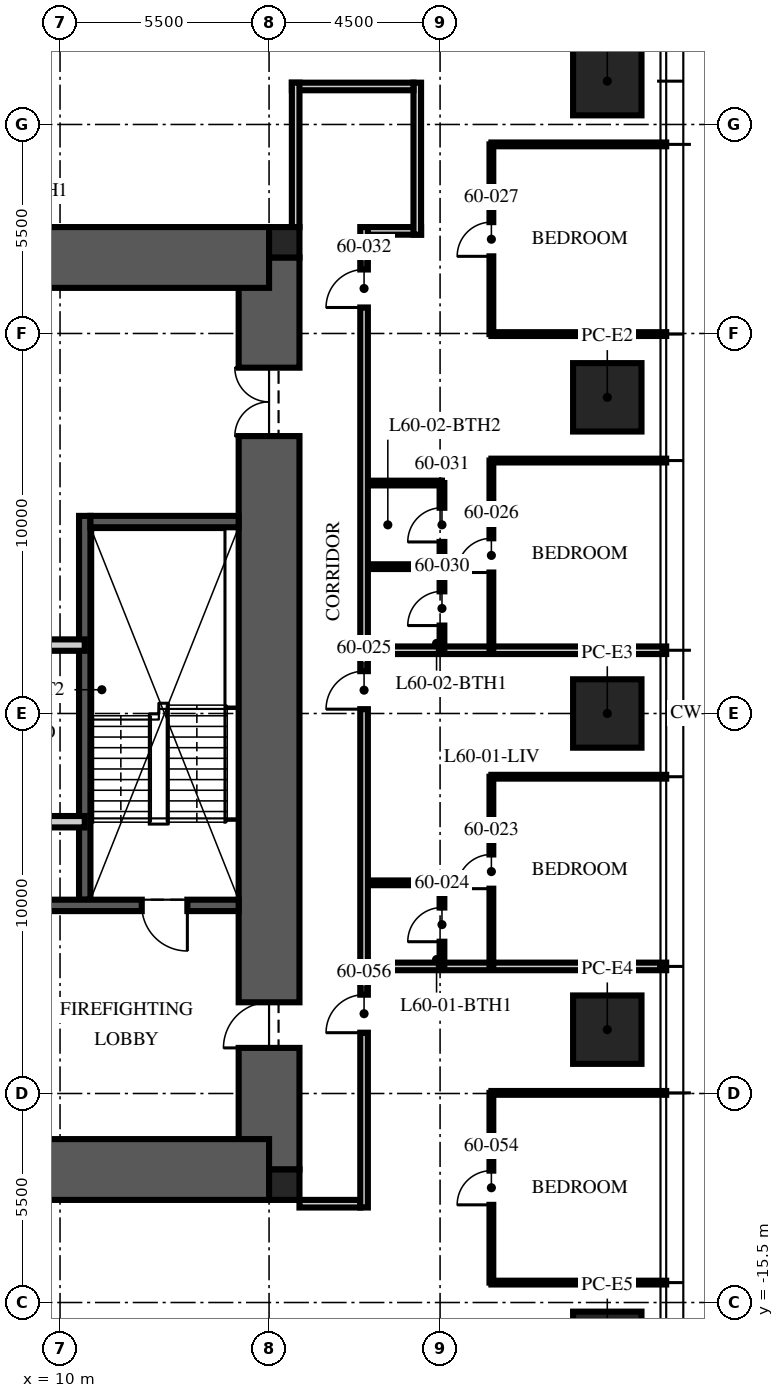
"""IFC4 building model, lengths in metres.
Left out: names, types, materials, properties, quantities, classifications, styles, units other than length and angle.
Written with IfcOpenShell. Run it as: python <this file> out.ifc"""

import sys

from ifc_helpers import new_model, si_unit, direction, frame, frame_2d, origin, origin_2d, place, context, subcontext, project, spatial, rectangle, extrude, element, fill, save


model = new_model("IFC4")
c1 = context("Model", 3, precision=1e-05, world=origin(), true_north=direction((0.0, 1.0)))
c2 = subcontext(c1, "Body", "Model", "MODEL_VIEW")
j1 = project(units=[si_unit("LENGTHUNIT", "METRE"), si_unit("PLANEANGLEUNIT", "RADIAN")], contexts=[c1])
p1 = place(None, origin())
s1 = spatial("IfcSite", under=j1, at=p1, CompositionType="ELEMENT")
p2 = place(p1, origin())
s2 = spatial("IfcBuilding", under=s1, at=p2, CompositionType="ELEMENT")
p3 = place(p2, frame((0.0, 0.0, 240.75)))
s3 = spatial("IfcBuildingStorey", under=s2, at=p3, CompositionType="ELEMENT", Elevation=240.75)
p4 = place(p3, frame((15.5, -12.0, -0.25), z_axis=(0.0, 0.0, 1.0), x_axis=(0.0, 1.0, 0.0)))
e1 = element("IfcWall", 1, at=p4, inside=s3, PredefinedType="SHEAR", context=c2, shape_type="SweptSolid", body=[
    extrude(rectangle(XDim=24.0, YDim=1.6, at=frame_2d((12.0, 0.0))), origin(), (0.0, 0.0, 1.0), 3.75),
])
p5 = place(p4, frame((3.2, 0.0, 0.25)))
e2 = element("IfcOpeningElement", 2, at=p5, cuts=e1, PredefinedType="OPENING", context=c2, shape_type="SweptSolid", body=[
    extrude(rectangle(XDim=1.2, YDim=2.1, at=frame_2d((0.6, 1.05))), frame((0.0, 0.81, 0.0), z_axis=(0.0, -1.0, 0.0), x_axis=(1.0, 0.0, 0.0)), (0.0, 0.0, 1.0), 1.62),
])
p6 = place(p4, frame((19.3, 0.0, 0.25)))
e3 = element("IfcOpeningElement", 3, at=p6, cuts=e1, PredefinedType="OPENING", context=c2, shape_type="SweptSolid", body=[
    extrude(rectangle(XDim=1.8, YDim=2.1, at=frame_2d((0.9, 1.05))), frame((0.0, 0.81, 0.0), z_axis=(0.0, -1.0, 0.0), x_axis=(1.0, 0.0, 0.0)), (0.0, 0.0, 1.0), 1.62),
])
for number, where, z_axis, x_axis in (
    (4, (-15.5, 12.0, -0.25), (0.0, 0.0, 1.0), (1.0, 0.0, 0.0)),
    (5, (-15.5, -12.0, -0.25), (0.0, 0.0, 1.0), (1.0, 0.0, 0.0)),
):
    element("IfcWall", number, at=place(p3, frame(where, z_axis=z_axis, x_axis=x_axis)), inside=s3, PredefinedType="SHEAR", context=c2, shape_type="SweptSolid", body=[
        extrude(rectangle(XDim=31.0, YDim=1.6, at=frame_2d((15.5, 0.0))), origin(), (0.0, 0.0, 1.0), 3.75),
    ])
for number, where, z_axis, x_axis in (
    (6, (15.9, 12.4, -0.25), (0.0, 0.0, 1.0), (1.0, 0.0, 0.0)),
    (7, (15.9, -12.4, -0.25), (0.0, 0.0, 1.0), (1.0, 0.0, 0.0)),
):
    element("IfcColumn", number, at=place(p3, frame(where, z_axis=z_axis, x_axis=x_axis)), inside=s3, PredefinedType="COLUMN", context=c2, shape_type="SweptSolid", body=[
        extrude(rectangle(XDim=0.8, YDim=0.8, at=origin_2d()), origin(), (0.0, 0.0, 1.0), 3.75),
    ])
for number, where, z_axis, x_axis in (
    (8, (24.4, 16.64, 0.0), (0.0, 0.0, 1.0), (0.0, 1.0, 0.0)),
    (9, (24.4, 8.32, 0.0), (0.0, 0.0, 1.0), (0.0, 1.0, 0.0)),
    (10, (24.4, 0.0, 0.0), (0.0, 0.0, 1.0), (0.0, 1.0, 0.0)),
    (11, (24.4, -8.32, 0.0), (0.0, 0.0, 1.0), (0.0, 1.0, 0.0)),
    (12, (24.4, -16.64, 0.0), (0.0, 0.0, 1.0), (0.0, 1.0, 0.0)),
):
    element("IfcColumn", number, at=place(p3, frame(where, z_axis=z_axis, x_axis=x_axis)), inside=s3, PredefinedType="COLUMN", context=c2, shape_type="SweptSolid", body=[
        extrude(rectangle(XDim=1.8, YDim=1.8, at=origin_2d()), origin(), (0.0, 0.0, 1.0), 3.75),
    ])
p7 = place(p3, frame((10.65, -4.9, 0.0), z_axis=(0.0, 0.0, 1.0), x_axis=(0.0, 1.0, 0.0)))
e13 = element("IfcWall", 13, at=p7, inside=s3, PredefinedType="SOLIDWALL", context=c2, shape_type="SweptSolid", body=[
    extrude(rectangle(XDim=10.1, YDim=0.3, at=frame_2d((5.05, 0.0))), origin(), (0.0, 0.0, 1.0), 3.5),
])
p8 = place(p3, frame((14.7, -5.05, 0.0), z_axis=(0.0, 0.0, 1.0), x_axis=(-1.0, 0.0, 0.0)))
e14 = element("IfcWall", 14, at=p8, inside=s3, PredefinedType="SOLIDWALL", context=c2, shape_type="SweptSolid", body=[
    extrude(rectangle(XDim=5.9, YDim=0.3, at=frame_2d((2.95, 0.0))), origin(), (0.0, 0.0, 1.0), 3.5),
])
p9 = place(p8, frame((1.35, 0.0, 0.0)))
e15 = element("IfcOpeningElement", 15, at=p9, cuts=e14, PredefinedType="OPENING", context=c2, shape_type="SweptSolid", body=[
    extrude(rectangle(XDim=1.2, YDim=2.1, at=frame_2d((0.6, 1.05))), frame((0.0, 0.16, 0.0), z_axis=(0.0, -1.0, 0.0), x_axis=(1.0, 0.0, 0.0)), (0.0, 0.0, 1.0), 0.32),
])
p10 = place(p3, frame((14.7, 5.05, 0.0), z_axis=(0.0, 0.0, 1.0), x_axis=(-1.0, 0.0, 0.0)))
e16 = element("IfcWall", 16, at=p10, inside=s3, PredefinedType="SOLIDWALL", context=c2, shape_type="SweptSolid", body=[
    extrude(rectangle(XDim=3.9, YDim=0.3, at=frame_2d((1.95, 0.0))), origin(), (0.0, 0.0, 1.0), 3.5),
])
p11 = place(p3, frame((-10.65, 1.8, 0.0), z_axis=(0.0, 0.0, 1.0), x_axis=(1.0, 0.0, 0.0)))
e17 = element("IfcWall", 17, at=p11, inside=s3, PredefinedType="PARTITIONING", context=c2, shape_type="SweptSolid", body=[
    extrude(rectangle(XDim=21.3, YDim=0.3, at=frame_2d((10.65, 0.0))), origin(), (0.0, 0.0, 1.0), 3.5),
])
p12 = place(p11, frame((10.05, 0.0, 0.0)))
e18 = element("IfcOpeningElement", 18, at=p12, cuts=e17, PredefinedType="OPENING", context=c2, shape_type="SweptSolid", body=[
    extrude(rectangle(XDim=1.2, YDim=2.1, at=frame_2d((0.6, 1.05))), frame((0.0, 0.16, 0.0), z_axis=(0.0, -1.0, 0.0), x_axis=(1.0, 0.0, 0.0)), (0.0, 0.0, 1.0), 0.32),
])
p13 = place(p11, frame((19.238, 0.0, 0.0)))
e19 = element("IfcOpeningElement", 19, at=p13, cuts=e17, PredefinedType="OPENING", context=c2, shape_type="SweptSolid", body=[
    extrude(rectangle(XDim=0.9, YDim=2.1, at=frame_2d((0.45, 1.05))), frame((0.0, 0.16, 0.0), z_axis=(0.0, -1.0, 0.0), x_axis=(1.0, 0.0, 0.0)), (0.0, 0.0, 1.0), 0.32),
])
p14 = place(p3, frame((10.65, -2.848, 0.0), z_axis=(0.0, 0.0, 1.0), x_axis=(-1.0, 0.0, 0.0)))
e20 = element("IfcWall", 20, at=p14, inside=s3, PredefinedType="PARTITIONING", context=c2, shape_type="SweptSolid", body=[
    extrude(rectangle(XDim=6.45, YDim=0.3, at=frame_2d((3.225, 0.0))), origin(), (0.0, 0.0, 1.0), 3.5),
])
p15 = place(p3, frame((18.1, 12.7, 0.0), z_axis=(0.0, 0.0, 1.0), x_axis=(1.0, 0.0, 0.0)))
e21 = element("IfcWall", 21, at=p15, inside=s3, PredefinedType="PARTITIONING", context=c2, shape_type="SweptSolid", body=[
    extrude(rectangle(XDim=1.4, YDim=0.2, at=frame_2d((0.7, 0.0))), origin(), (0.0, 0.0, 1.0), 2.81),
])
p16 = place(p3, frame((19.4, 12.6, 0.0), z_axis=(0.0, 0.0, 1.0), x_axis=(0.0, 1.0, 0.0)))
e22 = element("IfcWall", 22, at=p16, inside=s3, PredefinedType="PARTITIONING", context=c2, shape_type="SweptSolid", body=[
    extrude(rectangle(XDim=4.0, YDim=0.2, at=frame_2d((2.0, 0.0))), origin(), (0.0, 0.0, 1.0), 2.6),
])
p17 = place(p3, frame((19.3, 16.5, 0.0), z_axis=(0.0, 0.0, 1.0), x_axis=(-1.0, 0.0, 0.0)))
e23 = element("IfcWall", 23, at=p17, inside=s3, PredefinedType="PARTITIONING", context=c2, shape_type="SweptSolid", body=[
    extrude(rectangle(XDim=3.2, YDim=0.2, at=frame_2d((1.6, 0.0))), origin(), (0.0, 0.0, 1.0), 2.3),
])
p18 = place(p3, frame((16.2, 16.6, 0.0), z_axis=(0.0, 0.0, 1.0), x_axis=(0.0, -1.0, 0.0)))
e24 = element("IfcWall", 24, at=p18, inside=s3, PredefinedType="PARTITIONING", context=c2, shape_type="SweptSolid", body=[
    extrude(rectangle(XDim=3.8, YDim=0.2, at=frame_2d((1.9, 0.0))), origin(), (0.0, 0.0, 1.0), 2.3),
])
p19 = place(p3, frame((16.3, -12.9, 0.0), z_axis=(0.0, 0.0, 1.0), x_axis=(1.0, 0.0, 0.0)))
e25 = element("IfcWall", 25, at=p19, inside=s3, PredefinedType="PARTITIONING", context=c2, shape_type="SweptSolid", body=[
    extrude(rectangle(XDim=1.6, YDim=0.2, at=frame_2d((0.8, 0.0))), origin(), (0.0, 0.0, 1.0), 2.3),
])
p20 = place(p3, frame((18.1, -6.656, 0.0), z_axis=(0.0, 0.0, 1.0), x_axis=(1.0, 0.0, 0.0)))
e26 = element("IfcWall", 26, at=p20, inside=s3, PredefinedType="PARTITIONING", context=c2, shape_type="SweptSolid", body=[
    extrude(rectangle(XDim=7.85, YDim=0.2, at=frame_2d((3.925, 0.0))), origin(), (0.0, 0.0, 1.0), 2.91),
])
p21 = place(p3, frame((21.35, -1.664, 0.0), z_axis=(0.0, 0.0, 1.0), x_axis=(1.0, 0.0, 0.0)))
e27 = element("IfcWall", 27, at=p21, inside=s3, PredefinedType="PARTITIONING", context=c2, shape_type="SweptSolid", body=[
    extrude(rectangle(XDim=4.6, YDim=0.1, at=frame_2d((2.3, 0.0))), origin(), (0.0, 0.0, 1.0), 2.91),
])
p22 = place(p3, frame((18.1, 1.664, 0.0), z_axis=(0.0, 0.0, 1.0), x_axis=(1.0, 0.0, 0.0)))
e28 = element("IfcWall", 28, at=p22, inside=s3, PredefinedType="PARTITIONING", context=c2, shape_type="SweptSolid", body=[
    extrude(rectangle(XDim=7.85, YDim=0.2, at=frame_2d((3.925, 0.0))), origin(), (0.0, 0.0, 1.0), 2.91),
])
for number, where, z_axis, x_axis in (
    (29, (21.35, 6.656, 0.0), (0.0, 0.0, 1.0), (1.0, 0.0, 0.0)),
    (30, (21.35, 9.984, 0.0), (0.0, 0.0, 1.0), (1.0, 0.0, 0.0)),
    (31, (21.35, 14.976, 0.0), (0.0, 0.0, 1.0), (1.0, 0.0, 0.0)),
    (32, (21.35, -14.976, 0.0), (0.0, 0.0, 1.0), (1.0, 0.0, 0.0)),
    (33, (21.35, -9.984, 0.0), (0.0, 0.0, 1.0), (1.0, 0.0, 0.0)),
):
    element("IfcWall", number, at=place(p3, frame(where, z_axis=z_axis, x_axis=x_axis)), inside=s3, PredefinedType="PARTITIONING", context=c2, shape_type="SweptSolid", body=[
        extrude(rectangle(XDim=4.6, YDim=0.1, at=frame_2d((2.3, 0.0))), origin(), (0.0, 0.0, 1.0), 2.91),
    ])
p23 = place(p3, frame((21.35, -6.656, 0.0), z_axis=(0.0, 0.0, 1.0), x_axis=(0.0, 1.0, 0.0)))
e34 = element("IfcWall", 34, at=p23, inside=s3, PredefinedType="PARTITIONING", context=c2, shape_type="SweptSolid", body=[
    extrude(rectangle(XDim=4.992, YDim=0.1, at=frame_2d((2.496, 0.0))), origin(), (0.0, 0.0, 1.0), 2.81),
])
p24 = place(p23, frame((2.046, 0.0, 0.0)))
e35 = element("IfcOpeningElement", 35, at=p24, cuts=e34, PredefinedType="OPENING", context=c2, shape_type="SweptSolid", body=[
    extrude(rectangle(XDim=0.9, YDim=2.1, at=frame_2d((0.45, 1.05))), frame((0.0, 0.06, 0.0), z_axis=(0.0, -1.0, 0.0), x_axis=(1.0, 0.0, 0.0)), (0.0, 0.0, 1.0), 0.12),
])
p25 = place(p3, frame((20.05, -6.656, 0.0), z_axis=(0.0, 0.0, 1.0), x_axis=(0.0, 1.0, 0.0)))
e36 = element("IfcWall", 36, at=p25, inside=s3, PredefinedType="PARTITIONING", context=c2, shape_type="SweptSolid", body=[
    extrude(rectangle(XDim=2.2, YDim=0.125, at=frame_2d((1.1, 0.0))), origin(), (0.0, 0.0, 1.0), 3.5),
])
p26 = place(p25, frame((0.65, 0.0, 0.0)))
e37 = element("IfcOpeningElement", 37, at=p26, cuts=e36, PredefinedType="OPENING", context=c2, shape_type="SweptSolid", body=[
    extrude(rectangle(XDim=0.9, YDim=2.1, at=frame_2d((0.45, 1.05))), frame((0.0, 0.073, 0.0), z_axis=(0.0, -1.0, 0.0), x_axis=(1.0, 0.0, 0.0)), (0.0, 0.0, 1.0), 0.145),
])
p27 = place(p3, frame((18.1, -4.456, 0.0), z_axis=(0.0, 0.0, 1.0), x_axis=(1.0, 0.0, 0.0)))
e38 = element("IfcWall", 38, at=p27, inside=s3, PredefinedType="PARTITIONING", context=c2, shape_type="SweptSolid", body=[
    extrude(rectangle(XDim=1.95, YDim=0.125, at=frame_2d((0.975, 0.0))), origin(), (0.0, 0.0, 1.0), 3.5),
])
p28 = place(p3, frame((21.35, 1.664, 0.0), z_axis=(0.0, 0.0, 1.0), x_axis=(0.0, 1.0, 0.0)))
e39 = element("IfcWall", 39, at=p28, inside=s3, PredefinedType="PARTITIONING", context=c2, shape_type="SweptSolid", body=[
    extrude(rectangle(XDim=4.992, YDim=0.1, at=frame_2d((2.496, 0.0))), origin(), (0.0, 0.0, 1.0), 2.81),
])
p29 = place(p28, frame((2.046, 0.0, 0.0)))
e40 = element("IfcOpeningElement", 40, at=p29, cuts=e39, PredefinedType="OPENING", context=c2, shape_type="SweptSolid", body=[
    extrude(rectangle(XDim=0.9, YDim=2.1, at=frame_2d((0.45, 1.05))), frame((0.0, 0.06, 0.0), z_axis=(0.0, -1.0, 0.0), x_axis=(1.0, 0.0, 0.0)), (0.0, 0.0, 1.0), 0.12),
])
p30 = place(p3, frame((21.35, 9.984, 0.0), z_axis=(0.0, 0.0, 1.0), x_axis=(0.0, 1.0, 0.0)))
e41 = element("IfcWall", 41, at=p30, inside=s3, PredefinedType="PARTITIONING", context=c2, shape_type="SweptSolid", body=[
    extrude(rectangle(XDim=4.992, YDim=0.1, at=frame_2d((2.496, 0.0))), origin(), (0.0, 0.0, 1.0), 2.81),
])
p31 = place(p30, frame((2.046, 0.0, 0.0)))
e42 = element("IfcOpeningElement", 42, at=p31, cuts=e41, PredefinedType="OPENING", context=c2, shape_type="SweptSolid", body=[
    extrude(rectangle(XDim=0.9, YDim=2.1, at=frame_2d((0.45, 1.05))), frame((0.0, 0.06, 0.0), z_axis=(0.0, -1.0, 0.0), x_axis=(1.0, 0.0, 0.0)), (0.0, 0.0, 1.0), 0.12),
])
p32 = place(p3, frame((20.05, 1.664, 0.0), z_axis=(0.0, 0.0, 1.0), x_axis=(0.0, 1.0, 0.0)))
e43 = element("IfcWall", 43, at=p32, inside=s3, PredefinedType="PARTITIONING", context=c2, shape_type="SweptSolid", body=[
    extrude(rectangle(XDim=4.4, YDim=0.125, at=frame_2d((2.2, 0.0))), origin(), (0.0, 0.0, 1.0), 2.81),
])
p33 = place(p32, frame((0.65, 0.0, 0.0)))
e44 = element("IfcOpeningElement", 44, at=p33, cuts=e43, PredefinedType="OPENING", context=c2, shape_type="SweptSolid", body=[
    extrude(rectangle(XDim=0.9, YDim=2.1, at=frame_2d((0.45, 1.05))), frame((0.0, 0.073, 0.0), z_axis=(0.0, -1.0, 0.0), x_axis=(1.0, 0.0, 0.0)), (0.0, 0.0, 1.0), 0.145),
])
p34 = place(p32, frame((2.85, 0.0, 0.0)))
e45 = element("IfcOpeningElement", 45, at=p34, cuts=e43, PredefinedType="OPENING", context=c2, shape_type="SweptSolid", body=[
    extrude(rectangle(XDim=0.9, YDim=2.1, at=frame_2d((0.45, 1.05))), frame((0.0, 0.073, 0.0), z_axis=(0.0, -1.0, 0.0), x_axis=(1.0, 0.0, 0.0)), (0.0, 0.0, 1.0), 0.145),
])
for number, where, z_axis, x_axis in (
    (46, (18.1, 3.864, 0.0), (0.0, 0.0, 1.0), (1.0, 0.0, 0.0)),
    (47, (18.1, 6.064, 0.0), (0.0, 0.0, 1.0), (1.0, 0.0, 0.0)),
):
    element("IfcWall", number, at=place(p3, frame(where, z_axis=z_axis, x_axis=x_axis)), inside=s3, PredefinedType="PARTITIONING", context=c2, shape_type="SweptSolid", body=[
        extrude(rectangle(XDim=1.95, YDim=0.125, at=frame_2d((0.975, 0.0))), origin(), (0.0, 0.0, 1.0), 3.5),
    ])
p35 = place(p3, frame((21.35, -14.976, 0.0), z_axis=(0.0, 0.0, 1.0), x_axis=(0.0, 1.0, 0.0)))
e48 = element("IfcWall", 48, at=p35, inside=s3, PredefinedType="PARTITIONING", context=c2, shape_type="SweptSolid", body=[
    extrude(rectangle(XDim=4.992, YDim=0.1, at=frame_2d((2.496, 0.0))), origin(), (0.0, 0.0, 1.0), 2.81),
])
p36 = place(p35, frame((2.046, 0.0, 0.0)))
e49 = element("IfcOpeningElement", 49, at=p36, cuts=e48, PredefinedType="OPENING", context=c2, shape_type="SweptSolid", body=[
    extrude(rectangle(XDim=0.9, YDim=2.1, at=frame_2d((0.45, 1.05))), frame((0.0, 0.06, 0.0), z_axis=(0.0, -1.0, 0.0), x_axis=(1.0, 0.0, 0.0)), (0.0, 0.0, 1.0), 0.12),
])
p37 = place(p3, frame((18.0, -13.0, 0.0), z_axis=(0.0, 0.0, 1.0), x_axis=(0.0, 1.0, 0.0)))
e50 = element("IfcWall", 50, at=p37, inside=s3, PredefinedType="PARTITIONING", context=c2, shape_type="SweptSolid", body=[
    extrude(rectangle(XDim=25.8, YDim=0.2, at=frame_2d((12.9, 0.0))), origin(), (0.0, 0.0, 1.0), 2.6),
])
p38 = place(p37, frame((13.114, 0.0, 0.0)))
e51 = element("IfcOpeningElement", 51, at=p38, cuts=e50, PredefinedType="OPENING", context=c2, shape_type="SweptSolid", body=[
    extrude(rectangle(XDim=1.0, YDim=2.2, at=frame_2d((0.5, 1.1))), frame((0.0, 0.11, 0.0), z_axis=(0.0, -1.0, 0.0), x_axis=(1.0, 0.0, 0.0)), (0.0, 0.0, 1.0), 0.22),
])
p39 = place(p37, frame((23.684, 0.0, 0.0)))
e52 = element("IfcOpeningElement", 52, at=p39, cuts=e50, PredefinedType="OPENING", context=c2, shape_type="SweptSolid", body=[
    extrude(rectangle(XDim=1.0, YDim=2.2, at=frame_2d((0.5, 1.1))), frame((0.0, 0.11, 0.0), z_axis=(0.0, -1.0, 0.0), x_axis=(1.0, 0.0, 0.0)), (0.0, 0.0, 1.0), 0.22),
])
p40 = place(p37, frame((4.6, 0.0, 0.0)))
e53 = element("IfcOpeningElement", 53, at=p40, cuts=e50, PredefinedType="OPENING", context=c2, shape_type="SweptSolid", body=[
    extrude(rectangle(XDim=1.0, YDim=2.2, at=frame_2d((0.5, 1.1))), frame((0.0, 0.11, 0.0), z_axis=(0.0, -1.0, 0.0), x_axis=(1.0, 0.0, 0.0)), (0.0, 0.0, 1.0), 0.22),
])
p41 = place(p9, origin())
e54 = element("IfcDoor", 54, at=p41, inside=s3, OperationType="SINGLE_SWING_LEFT", PredefinedType="DOOR", context=c2, shape_type="SweptSolid", body=[
    extrude(rectangle(XDim=1.2, YDim=2.1, at=frame_2d((0.6, 1.05))), frame((0.0, 0.025, 0.0), z_axis=(0.0, -1.0, 0.0), x_axis=(1.0, 0.0, 0.0)), (0.0, 0.0, 1.0), 0.05),
])
fill(e15, e54)
p42 = place(p5, origin())
e55 = element("IfcDoor", 55, at=p42, inside=s3, OperationType="SINGLE_SWING_LEFT", PredefinedType="DOOR", context=c2, shape_type="SweptSolid", body=[
    extrude(rectangle(XDim=1.2, YDim=2.1, at=frame_2d((0.6, 1.05))), frame((0.0, 0.025, 0.0), z_axis=(0.0, -1.0, 0.0), x_axis=(1.0, 0.0, 0.0)), (0.0, 0.0, 1.0), 0.05),
])
fill(e2, e55)
p43 = place(p6, origin())
e56 = element("IfcDoor", 56, at=p43, inside=s3, OperationType="DOUBLE_DOOR_SINGLE_SWING", PredefinedType="DOOR", context=c2, shape_type="SweptSolid", body=[
    extrude(rectangle(XDim=1.8, YDim=2.1, at=frame_2d((0.9, 1.05))), frame((0.0, 0.025, 0.0), z_axis=(0.0, -1.0, 0.0), x_axis=(1.0, 0.0, 0.0)), (0.0, 0.0, 1.0), 0.05),
])
fill(e3, e56)
p44 = place(p24, origin())
e57 = element("IfcDoor", 57, at=p44, inside=s3, OperationType="SINGLE_SWING_LEFT", PredefinedType="DOOR", context=c2, shape_type="SweptSolid", body=[
    extrude(rectangle(XDim=0.9, YDim=2.1, at=frame_2d((0.45, 1.05))), frame((0.0, 0.025, 0.0), z_axis=(0.0, -1.0, 0.0), x_axis=(1.0, 0.0, 0.0)), (0.0, 0.0, 1.0), 0.05),
])
fill(e35, e57)
p45 = place(p26, origin())
e58 = element("IfcDoor", 58, at=p45, inside=s3, OperationType="SINGLE_SWING_LEFT", PredefinedType="DOOR", context=c2, shape_type="SweptSolid", body=[
    extrude(rectangle(XDim=0.9, YDim=2.1, at=frame_2d((0.45, 1.05))), frame((0.0, 0.025, 0.0), z_axis=(0.0, -1.0, 0.0), x_axis=(1.0, 0.0, 0.0)), (0.0, 0.0, 1.0), 0.05),
])
fill(e37, e58)
p46 = place(p38, origin())
e59 = element("IfcDoor", 59, at=p46, inside=s3, OperationType="SINGLE_SWING_LEFT", PredefinedType="DOOR", context=c2, shape_type="SweptSolid", body=[
    extrude(rectangle(XDim=1.0, YDim=2.2, at=frame_2d((0.5, 1.1))), frame((0.0, 0.025, 0.0), z_axis=(0.0, -1.0, 0.0), x_axis=(1.0, 0.0, 0.0)), (0.0, 0.0, 1.0), 0.05),
])
fill(e51, e59)
p47 = place(p29, origin())
e60 = element("IfcDoor", 60, at=p47, inside=s3, OperationType="SINGLE_SWING_LEFT", PredefinedType="DOOR", context=c2, shape_type="SweptSolid", body=[
    extrude(rectangle(XDim=0.9, YDim=2.1, at=frame_2d((0.45, 1.05))), frame((0.0, 0.025, 0.0), z_axis=(0.0, -1.0, 0.0), x_axis=(1.0, 0.0, 0.0)), (0.0, 0.0, 1.0), 0.05),
])
fill(e40, e60)
p48 = place(p31, origin())
e61 = element("IfcDoor", 61, at=p48, inside=s3, OperationType="SINGLE_SWING_LEFT", PredefinedType="DOOR", context=c2, shape_type="SweptSolid", body=[
    extrude(rectangle(XDim=0.9, YDim=2.1, at=frame_2d((0.45, 1.05))), frame((0.0, 0.025, 0.0), z_axis=(0.0, -1.0, 0.0), x_axis=(1.0, 0.0, 0.0)), (0.0, 0.0, 1.0), 0.05),
])
fill(e42, e61)
p49 = place(p33, origin())
e62 = element("IfcDoor", 62, at=p49, inside=s3, OperationType="SINGLE_SWING_LEFT", PredefinedType="DOOR", context=c2, shape_type="SweptSolid", body=[
    extrude(rectangle(XDim=0.9, YDim=2.1, at=frame_2d((0.45, 1.05))), frame((0.0, 0.025, 0.0), z_axis=(0.0, -1.0, 0.0), x_axis=(1.0, 0.0, 0.0)), (0.0, 0.0, 1.0), 0.05),
])
fill(e44, e62)
p50 = place(p34, origin())
e63 = element("IfcDoor", 63, at=p50, inside=s3, OperationType="SINGLE_SWING_LEFT", PredefinedType="DOOR", context=c2, shape_type="SweptSolid", body=[
    extrude(rectangle(XDim=0.9, YDim=2.1, at=frame_2d((0.45, 1.05))), frame((0.0, 0.025, 0.0), z_axis=(0.0, -1.0, 0.0), x_axis=(1.0, 0.0, 0.0)), (0.0, 0.0, 1.0), 0.05),
])
fill(e45, e63)
p51 = place(p39, origin())
e64 = element("IfcDoor", 64, at=p51, inside=s3, OperationType="SINGLE_SWING_LEFT", PredefinedType="DOOR", context=c2, shape_type="SweptSolid", body=[
    extrude(rectangle(XDim=1.0, YDim=2.2, at=frame_2d((0.5, 1.1))), frame((0.0, 0.025, 0.0), z_axis=(0.0, -1.0, 0.0), x_axis=(1.0, 0.0, 0.0)), (0.0, 0.0, 1.0), 0.05),
])
fill(e52, e64)
p52 = place(p36, origin())
e65 = element("IfcDoor", 65, at=p52, inside=s3, OperationType="SINGLE_SWING_LEFT", PredefinedType="DOOR", context=c2, shape_type="SweptSolid", body=[
    extrude(rectangle(XDim=0.9, YDim=2.1, at=frame_2d((0.45, 1.05))), frame((0.0, 0.025, 0.0), z_axis=(0.0, -1.0, 0.0), x_axis=(1.0, 0.0, 0.0)), (0.0, 0.0, 1.0), 0.05),
])
fill(e49, e65)
p53 = place(p40, origin())
e66 = element("IfcDoor", 66, at=p53, inside=s3, OperationType="SINGLE_SWING_LEFT", PredefinedType="DOOR", context=c2, shape_type="SweptSolid", body=[
    extrude(rectangle(XDim=1.0, YDim=2.2, at=frame_2d((0.5, 1.1))), frame((0.0, 0.025, 0.0), z_axis=(0.0, -1.0, 0.0), x_axis=(1.0, 0.0, 0.0)), (0.0, 0.0, 1.0), 0.05),
])
fill(e53, e66)
save(model, sys.argv[1])
